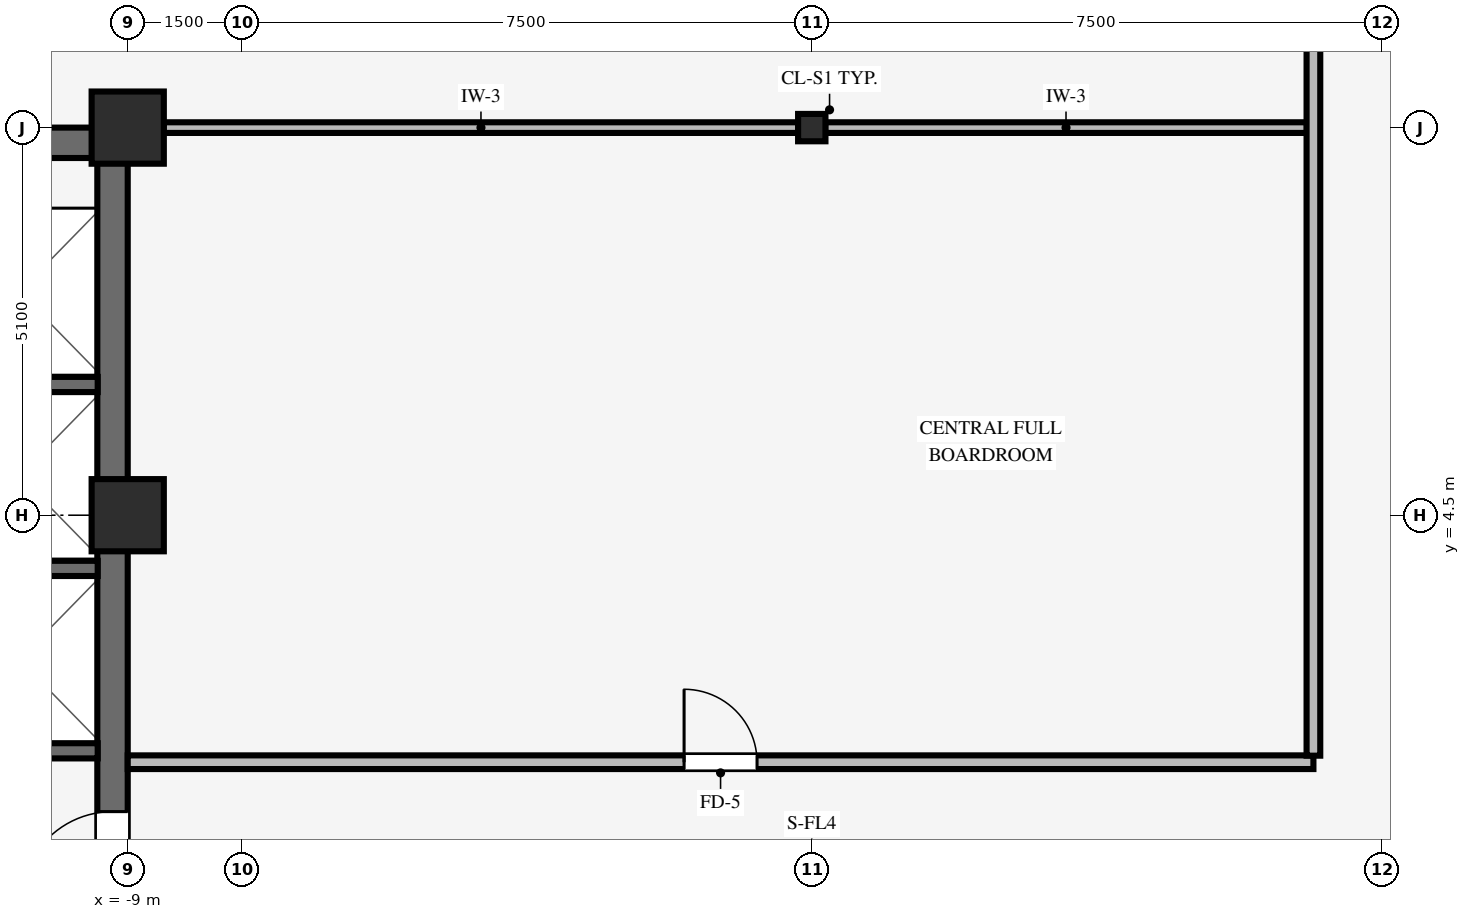
"""IFC4 building model, lengths in metres.
Left out: names, types, materials, properties, quantities, classifications, styles, units other than length and angle.
Written with IfcOpenShell. Run it as: python <this file> out.ifc"""

import sys

from ifc_helpers import new_model, si_unit, direction, frame, frame_2d, origin, origin_2d, place, context, subcontext, project, spatial, rectangle, i_section, extrude, source, transform, mapped, element, fill, save


model = new_model("IFC4")
c1 = context("Model", 3, precision=1e-05, world=origin(), true_north=direction((0.0, 1.0)))
c2 = subcontext(c1, "Body", "Model", "MODEL_VIEW")
j1 = project(units=[si_unit("LENGTHUNIT", "METRE"), si_unit("PLANEANGLEUNIT", "RADIAN")], contexts=[c1])
p1 = place(None, origin())
s1 = spatial("IfcSite", under=j1, at=p1, CompositionType="ELEMENT")
p2 = place(p1, origin())
s2 = spatial("IfcBuilding", under=s1, at=p2, CompositionType="ELEMENT")
p3 = place(p2, frame((0.0, 0.0, 153.05)))
s3 = spatial("IfcBuildingStorey", under=s2, at=p3, CompositionType="ELEMENT", Elevation=153.05)
p4 = place(p3, frame((-17.5, 9.4, 0.0), z_axis=(0.0, 0.0, 1.0), x_axis=(1.0, 0.0, 0.0)))
e1 = element("IfcWall", 1, at=p4, inside=s3, PredefinedType="SHEAR", context=c2, shape_type="SweptSolid", body=[
    extrude(rectangle(XDim=8.5, YDim=0.4, at=frame_2d((4.25, 0.0))), origin(), (0.0, 0.0, 1.0), 3.37),
])
p5 = place(p3, frame((-9.2, -9.205, 0.0), z_axis=(0.0, 0.0, 1.0), x_axis=(0.0, 1.0, 0.0)))
e2 = element("IfcWall", 2, at=p5, inside=s3, PredefinedType="SHEAR", context=c2, shape_type="SweptSolid", body=[
    extrude(rectangle(XDim=18.41, YDim=0.4, at=frame_2d((9.205, 0.0))), origin(), (0.0, 0.0, 1.0), 3.37),
])
p6 = place(p5, frame((8.605, 0.0, 0.0)))
e3 = element("IfcOpeningElement", 3, at=p6, cuts=e2, PredefinedType="OPENING", context=c2, shape_type="SweptSolid", body=[
    extrude(rectangle(XDim=1.2, YDim=2.15, at=frame_2d((0.6, 1.075))), frame((0.0, 0.21, 0.0), z_axis=(0.0, -1.0, 0.0), x_axis=(1.0, 0.0, 0.0)), (0.0, 0.0, 1.0), 0.42),
])
for number, where, z_axis, x_axis in (
    (4, (-9.0, 4.5, 0.0), (0.0, 0.0, 1.0), (1.0, 0.0, 0.0)),
    (5, (-9.0, 9.6, 0.0), (0.0, 0.0, 1.0), (1.0, 0.0, 0.0)),
):
    element("IfcColumn", number, at=place(p3, frame(where, z_axis=z_axis, x_axis=x_axis)), inside=s3, PredefinedType="COLUMN", context=c2, shape_type="SweptSolid", body=[
        extrude(rectangle(XDim=0.95, YDim=0.95, at=origin_2d()), origin(), (0.0, 0.0, 1.0), 3.37),
    ])
p7 = place(p3, frame((0.0, 9.6, 0.0), z_axis=(0.0, 0.0, 1.0), x_axis=(1.0, 0.0, 0.0)))
e6 = element("IfcColumn", 6, at=p7, inside=s3, PredefinedType="COLUMN", context=c2, shape_type="SweptSolid", body=[
    extrude(i_section(OverallWidth=0.36, OverallDepth=0.36, WebThickness=0.021, FlangeThickness=0.021, FilletRadius=0.018, at=origin_2d()), origin(), (0.0, 0.0, 1.0), 3.37),
])
for number, where, z_axis, x_axis in (
    (7, (-11.505, 1.4, 0.0), (0.0, 0.0, 1.0), (1.0, 0.0, 0.0)),
    (8, (-11.505, 3.8, 0.0), (0.0, 0.0, 1.0), (1.0, 0.0, 0.0)),
    (9, (-11.505, 6.22, 0.0), (0.0, 0.0, 1.0), (1.0, 0.0, 0.0)),
):
    element("IfcWall", number, at=place(p3, frame(where, z_axis=z_axis, x_axis=x_axis)), inside=s3, PredefinedType="SHEAR", context=c2, shape_type="SweptSolid", body=[
        extrude(rectangle(XDim=2.11, YDim=0.2, at=frame_2d((1.055, 0.0))), origin(), (0.0, 0.0, 1.0), 3.37),
    ])
p8 = place(p3, frame((-9.0, 1.25, 0.0), z_axis=(0.0, 0.0, 1.0), x_axis=(1.0, 0.0, 0.0)))
e10 = element("IfcWall", 10, at=p8, inside=s3, PredefinedType="PARTITIONING", context=c2, shape_type="SweptSolid", body=[
    extrude(rectangle(XDim=15.6, YDim=0.18, at=frame_2d((7.8, 0.0))), origin(), (0.0, 0.0, 1.0), 3.36),
])
p9 = place(p8, frame((7.32, 0.0, 0.0)))
e11 = element("IfcOpeningElement", 11, at=p9, cuts=e10, PredefinedType="OPENING", context=c2, shape_type="SweptSolid", body=[
    extrude(rectangle(XDim=0.96, YDim=2.1, at=frame_2d((0.48, 1.05))), frame((0.0, 0.1, 0.0), z_axis=(0.0, -1.0, 0.0), x_axis=(1.0, 0.0, 0.0)), (0.0, 0.0, 1.0), 0.2),
])
p10 = place(p3, frame((-8.529, 9.6, 0.0), z_axis=(0.0, 0.0, 1.0), x_axis=(1.0, 0.0, 0.0)))
e12 = element("IfcWall", 12, at=p10, inside=s3, PredefinedType="PARTITIONING", context=c2, shape_type="SweptSolid", body=[
    extrude(rectangle(XDim=8.353, YDim=0.14, at=frame_2d((4.177, 0.0))), origin(), (0.0, 0.0, 1.0), 2.405),
])
p11 = place(p3, frame((0.176, 9.6, 0.0), z_axis=(0.0, 0.0, 1.0), x_axis=(1.0, 0.0, 0.0)))
e13 = element("IfcWall", 13, at=p11, inside=s3, PredefinedType="PARTITIONING", context=c2, shape_type="SweptSolid", body=[
    extrude(rectangle(XDim=6.338, YDim=0.14, at=frame_2d((3.169, 0.0))), origin(), (0.0, 0.0, 1.0), 2.405),
])
p12 = place(p3, frame((6.6, 1.336, 0.0), z_axis=(0.0, 0.0, 1.0), x_axis=(0.0, 1.0, 0.0)))
e14 = element("IfcWall", 14, at=p12, inside=s3, PredefinedType="PARTITIONING", context=c2, shape_type="SweptSolid", body=[
    extrude(rectangle(XDim=12.078, YDim=0.18, at=frame_2d((6.039, 0.0))), origin(), (0.0, 0.0, 1.0), 3.36),
])
m1 = source(origin(), c2, "Body", "SweptSolid", [
    extrude(rectangle(XDim=1.2, YDim=2.15, at=frame_2d((0.6, 1.075))), frame((0.0, 0.025, 0.0), z_axis=(0.0, -1.0, 0.0), x_axis=(1.0, 0.0, 0.0)), (0.0, 0.0, 1.0), 0.05),
])
p13 = place(p6, origin())
e15 = element("IfcDoor", 15, at=p13, inside=s3, OperationType="SINGLE_SWING_LEFT", PredefinedType="DOOR", context=c2, shape_type="MappedRepresentation", body=[
    mapped(m1, transform((0.0, 0.0, 0.0), scale=1.0)),
])
fill(e3, e15)
m2 = source(origin(), c2, "Body", "SweptSolid", [
    extrude(rectangle(XDim=0.96, YDim=2.1, at=frame_2d((0.48, 1.05))), frame((0.0, 0.025, 0.0), z_axis=(0.0, -1.0, 0.0), x_axis=(1.0, 0.0, 0.0)), (0.0, 0.0, 1.0), 0.05),
])
p14 = place(p9, origin())
e16 = element("IfcDoor", 16, at=p14, inside=s3, OperationType="SINGLE_SWING_LEFT", PredefinedType="DOOR", context=c2, shape_type="MappedRepresentation", body=[
    mapped(m2, transform((0.0, 0.0, 0.0), scale=1.0)),
])
fill(e11, e16)
save(model, sys.argv[1])
